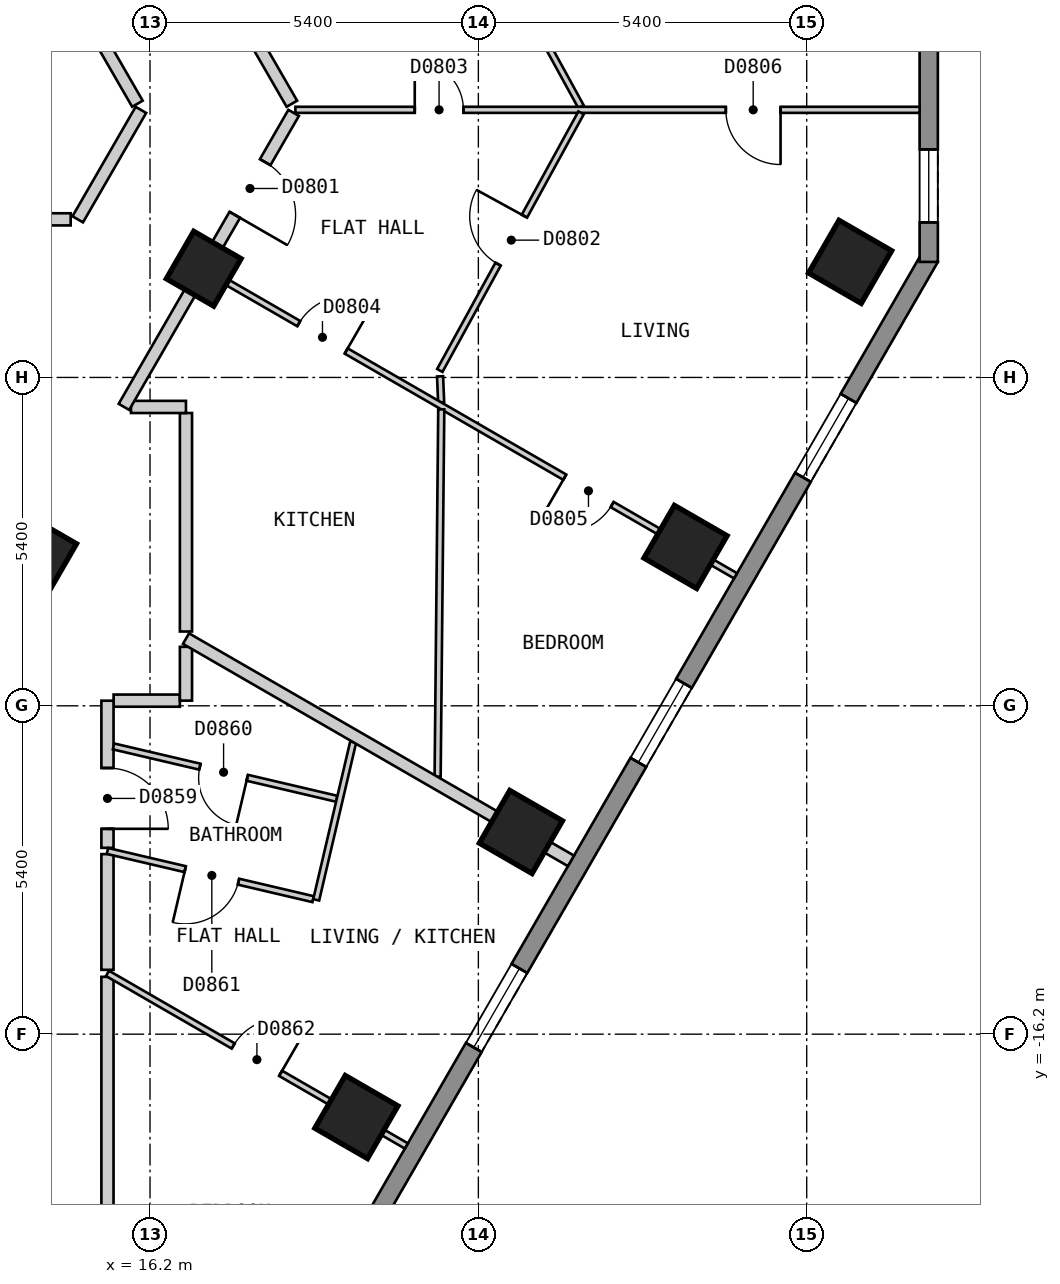
"""IFC4 building model, lengths in metres.
Left out: names, types, materials, properties, quantities, classifications, styles, units other than length and angle.
Written with IfcOpenShell. Run it as: python <this file> out.ifc"""

import sys

from ifc_helpers import new_model, si_unit, direction, frame, frame_2d, origin, origin_2d, place, context, subcontext, project, spatial, polyline, rectangle, outline, extrude, element, fill, save


model = new_model("IFC4")
c1 = context("Model", 3, precision=1e-05, world=origin(), true_north=direction((0.0, 1.0)))
c2 = subcontext(c1, "Body", "Model", "MODEL_VIEW")
j1 = project(units=[si_unit("LENGTHUNIT", "METRE"), si_unit("PLANEANGLEUNIT", "RADIAN")], contexts=[c1])
p1 = place(None, origin())
s1 = spatial("IfcSite", under=j1, at=p1, CompositionType="ELEMENT")
p2 = place(p1, origin())
s2 = spatial("IfcBuilding", under=s1, at=p2, CompositionType="ELEMENT")
p3 = place(p2, frame((0.0, 0.0, 84.0)))
s3 = spatial("IfcBuildingStorey", under=s2, at=p3, CompositionType="ELEMENT", Elevation=84.0)
for number, where, z_axis, x_axis in (
    (1, (19.594, -17.563, 0.0), (0.0, 0.0, 1.0), (0.5, 0.866, 0.0)),
    (2, (22.3, -12.875, 0.0), (0.0, 0.0, 1.0), (0.5, 0.866, 0.0)),
    (3, (25.007, -8.187, 0.0), (0.0, 0.0, 1.0), (0.5, 0.866, 0.0)),
    (4, (27.714, -3.499, 0.0), (0.0, 0.0, 1.0), (0.5, 0.866, 0.0)),
):
    element("IfcColumn", number, at=place(p3, frame(where, z_axis=z_axis, x_axis=x_axis)), inside=s3, PredefinedType="COLUMN", context=c2, shape_type="SweptSolid", body=[
        extrude(rectangle(XDim=1.0, YDim=1.0, at=origin_2d()), origin(), (0.0, 0.0, 1.0), 3.0),
    ])
for number, where, z_axis, x_axis in (
    (5, (14.376, -8.3, 0.0), (0.0, 0.0, 1.0), (0.5, 0.866, 0.0)),
    (6, (17.083, -3.612, 0.0), (0.0, 0.0, 1.0), (0.5, 0.866, 0.0)),
):
    element("IfcColumn", number, at=place(p3, frame(where, z_axis=z_axis, x_axis=x_axis)), inside=s3, PredefinedType="COLUMN", context=c2, shape_type="SweptSolid", body=[
        extrude(rectangle(XDim=0.9, YDim=0.9, at=origin_2d()), origin(), (0.0, 0.0, 1.0), 3.0),
    ])
p4 = place(p3, frame((17.479, -23.425, 0.0), z_axis=(0.0, 0.0, 1.0), x_axis=(0.500035407905, 0.866004960056, 0.0)))
e7 = element("IfcWall", 7, at=p4, inside=s3, PredefinedType="SOLIDWALL", context=c2, shape_type="SweptSolid", body=[
    extrude(outline(polyline([(0.0, -0.15), (23.094, -0.15), (23.014, 0.15), (0.08, 0.15), (0.0, -0.15)])), origin(), (0.0, 0.0, 1.0), 2.7),
])
p5 = place(p4, frame((2.677, 0.0, 0.15)))
e8 = element("IfcOpeningElement", 8, at=p5, cuts=e7, PredefinedType="OPENING", context=c2, shape_type="SweptSolid", body=[
    extrude(rectangle(XDim=1.5, YDim=2.1, at=frame_2d((0.75, 1.05))), frame((0.0, 0.16, 0.0), z_axis=(0.0, -1.0, 0.0), x_axis=(1.0, 0.0, 0.0)), (0.0, 0.0, 1.0), 0.32),
])
p6 = place(p4, frame((8.091, 0.0, 0.15)))
e9 = element("IfcOpeningElement", 9, at=p6, cuts=e7, PredefinedType="OPENING", context=c2, shape_type="SweptSolid", body=[
    extrude(rectangle(XDim=1.5, YDim=2.1, at=frame_2d((0.75, 1.05))), frame((0.0, 0.16, 0.0), z_axis=(0.0, -1.0, 0.0), x_axis=(1.0, 0.0, 0.0)), (0.0, 0.0, 1.0), 0.32),
])
p7 = place(p4, frame((13.504, 0.0, 0.15)))
e10 = element("IfcOpeningElement", 10, at=p7, cuts=e7, PredefinedType="OPENING", context=c2, shape_type="SweptSolid", body=[
    extrude(rectangle(XDim=1.5, YDim=2.1, at=frame_2d((0.75, 1.05))), frame((0.0, 0.16, 0.0), z_axis=(0.0, -1.0, 0.0), x_axis=(1.0, 0.0, 0.0)), (0.0, 0.0, 1.0), 0.32),
])
p8 = place(p4, frame((18.917, 0.0, 0.15)))
e11 = element("IfcOpeningElement", 11, at=p8, cuts=e7, PredefinedType="OPENING", context=c2, shape_type="SweptSolid", body=[
    extrude(rectangle(XDim=1.5, YDim=2.1, at=frame_2d((0.75, 1.05))), frame((0.0, 0.16, 0.0), z_axis=(0.0, -1.0, 0.0), x_axis=(1.0, 0.0, 0.0)), (0.0, 0.0, 1.0), 0.32),
])
p9 = place(p3, frame((29.007, -3.5, 0.0), z_axis=(0.0, 0.0, 1.0), x_axis=(0.0, 1.0, 0.0)))
e12 = element("IfcWall", 12, at=p9, inside=s3, PredefinedType="SOLIDWALL", context=c2, shape_type="SweptSolid", body=[
    extrude(outline(polyline([(0.0, -0.15), (5.0, -0.15), (4.92, 0.15), (0.08, 0.15), (0.0, -0.15)])), origin(), (0.0, 0.0, 1.0), 2.7),
])
p10 = place(p9, frame((0.65, 0.0, 0.15)))
e13 = element("IfcOpeningElement", 13, at=p10, cuts=e12, PredefinedType="OPENING", context=c2, shape_type="SweptSolid", body=[
    extrude(rectangle(XDim=1.2, YDim=2.1, at=frame_2d((0.6, 1.05))), frame((0.0, 0.16, 0.0), z_axis=(0.0, -1.0, 0.0), x_axis=(1.0, 0.0, 0.0)), (0.0, 0.0, 1.0), 0.32),
])
p11 = place(p3, frame((10.913, 7.899, 0.0), z_axis=(0.0, 0.0, 1.0), x_axis=(0.500028940566, -0.866008694296, 0.0)))
e14 = element("IfcWall", 14, at=p11, inside=s3, PredefinedType="PARTITIONING", context=c2, shape_type="SweptSolid", body=[
    extrude(rectangle(XDim=10.159, YDim=0.2, at=frame_2d((5.08, 0.0))), origin(), (0.0, 0.0, 1.0), 2.7),
])
p12 = place(p11, frame((4.63, 0.0, 0.0)))
e15 = element("IfcOpeningElement", 15, at=p12, cuts=e14, PredefinedType="OPENING", context=c2, shape_type="SweptSolid", body=[
    extrude(rectangle(XDim=0.9, YDim=2.1, at=frame_2d((0.45, 1.05))), frame((0.0, 0.11, 0.0), z_axis=(0.0, -1.0, 0.0), x_axis=(1.0, 0.0, 0.0)), (0.0, 0.0, 1.0), 0.22),
])
p13 = place(p3, frame((8.488, 16.5, 0.0), z_axis=(0.0, 0.0, 1.0), x_axis=(0.499986836607, -0.86603300354, 0.0)))
e16 = element("IfcWall", 16, at=p13, inside=s3, PredefinedType="PARTITIONING", context=c2, shape_type="SweptSolid", body=[
    extrude(rectangle(XDim=20.09, YDim=0.2, at=frame_2d((10.045, 0.0))), origin(), (0.0, 0.0, 1.0), 2.7),
])
p14 = place(p13, frame((4.523, 0.0, 0.0)))
e17 = element("IfcOpeningElement", 17, at=p14, cuts=e16, PredefinedType="OPENING", context=c2, shape_type="SweptSolid", body=[
    extrude(rectangle(XDim=1.0, YDim=2.1, at=frame_2d((0.5, 1.05))), frame((0.0, 0.11, 0.0), z_axis=(0.0, -1.0, 0.0), x_axis=(1.0, 0.0, 0.0)), (0.0, 0.0, 1.0), 0.22),
])
p15 = place(p3, frame((15.5, -13.239, 0.0), z_axis=(0.0, 0.0, 1.0), x_axis=(0.0, -1.0, 0.0)))
e18 = element("IfcWall", 18, at=p15, inside=s3, PredefinedType="PARTITIONING", context=c2, shape_type="SweptSolid", body=[
    extrude(rectangle(XDim=1.903, YDim=0.2, at=frame_2d((0.952, 0.0))), origin(), (0.0, 0.0, 1.0), 2.7),
])
p16 = place(p3, frame((16.791, -5.985, 0.0), z_axis=(0.0, 0.0, 1.0), x_axis=(0.0, -1.0, 0.0)))
e19 = element("IfcWall", 19, at=p16, inside=s3, PredefinedType="PARTITIONING", context=c2, shape_type="SweptSolid", body=[
    extrude(rectangle(XDim=3.593, YDim=0.2, at=frame_2d((1.796, 0.0))), origin(), (0.0, 0.0, 1.0), 2.7),
])
p17 = place(p3, frame((15.887, -5.885, 0.0), z_axis=(0.0, 0.0, 1.0), x_axis=(1.0, 0.0, 0.0)))
e20 = element("IfcWall", 20, at=p17, inside=s3, PredefinedType="PARTITIONING", context=c2, shape_type="SweptSolid", body=[
    extrude(rectangle(XDim=0.904, YDim=0.2, at=frame_2d((0.452, 0.0))), origin(), (0.0, 0.0, 1.0), 2.7),
])
p18 = place(p3, frame((15.601, -10.715, 0.0), z_axis=(0.0, 0.0, 1.0), x_axis=(1.0, 0.0, 0.0)))
e21 = element("IfcWall", 21, at=p18, inside=s3, PredefinedType="PARTITIONING", context=c2, shape_type="SweptSolid", body=[
    extrude(rectangle(XDim=1.09, YDim=0.2, at=frame_2d((0.545, 0.0))), origin(), (0.0, 0.0, 1.0), 2.7),
])
p19 = place(p3, frame((6.929, -2.8, 0.0), z_axis=(0.0, 0.0, 1.0), x_axis=(1.0, 0.0, 0.0)))
e22 = element("IfcWall", 22, at=p19, inside=s3, PredefinedType="PARTITIONING", context=c2, shape_type="SweptSolid", body=[
    extrude(rectangle(XDim=7.966, YDim=0.2, at=frame_2d((3.983, 0.0))), origin(), (0.0, 0.0, 1.0), 2.7),
])
p20 = place(p3, frame((15.011, -2.8, 0.0), z_axis=(0.0, 0.0, 1.0), x_axis=(0.499929208183, 0.866066271601, 0.0)))
e23 = element("IfcWall", 23, at=p20, inside=s3, PredefinedType="PARTITIONING", context=c2, shape_type="SweptSolid", body=[
    extrude(rectangle(XDim=2.078, YDim=0.2, at=frame_2d((1.039, 0.0))), origin(), (0.0, 0.0, 1.0), 2.7),
])
p21 = place(p3, frame((15.771, -5.884, 0.0), z_axis=(0.0, 0.0, 1.0), x_axis=(0.499939494019, 0.866060334111, 0.0)))
e24 = element("IfcWall", 24, at=p21, inside=s3, PredefinedType="PARTITIONING", context=c2, shape_type="SweptSolid", body=[
    extrude(rectangle(XDim=5.583, YDim=0.2, at=frame_2d((2.792, 0.0))), origin(), (0.0, 0.0, 1.0), 2.7),
])
p22 = place(p21, frame((3.647, 0.0, 0.0)))
e25 = element("IfcOpeningElement", 25, at=p22, cuts=e24, PredefinedType="OPENING", context=c2, shape_type="SweptSolid", body=[
    extrude(rectangle(XDim=1.0, YDim=2.1, at=frame_2d((0.5, 1.05))), frame((0.0, 0.11, 0.0), z_axis=(0.0, -1.0, 0.0), x_axis=(1.0, 0.0, 0.0)), (0.0, 0.0, 1.0), 0.22),
])
p23 = place(p3, frame((15.5, -21.199, 0.0), z_axis=(0.0, 0.0, 1.0), x_axis=(0.0, 1.0, 0.0)))
e26 = element("IfcWall", 26, at=p23, inside=s3, PredefinedType="PARTITIONING", context=c2, shape_type="SweptSolid", body=[
    extrude(rectangle(XDim=5.942, YDim=0.2, at=frame_2d((2.971, 0.0))), origin(), (0.0, 0.0, 1.0), 2.7),
])
p24 = place(p3, frame((15.5, -13.136, 0.0), z_axis=(0.0, 0.0, 1.0), x_axis=(0.0, 1.0, 0.0)))
e27 = element("IfcWall", 27, at=p24, inside=s3, PredefinedType="PARTITIONING", context=c2, shape_type="SweptSolid", body=[
    extrude(rectangle(XDim=2.42, YDim=0.2, at=frame_2d((1.21, 0.0))), origin(), (0.0, 0.0, 1.0), 2.7),
])
p25 = place(p24, frame((0.313, 0.0, 0.0)))
e28 = element("IfcOpeningElement", 28, at=p25, cuts=e27, PredefinedType="OPENING", context=c2, shape_type="SweptSolid", body=[
    extrude(rectangle(XDim=1.0, YDim=2.1, at=frame_2d((0.5, 1.05))), frame((0.0, 0.11, 0.0), z_axis=(0.0, -1.0, 0.0), x_axis=(1.0, 0.0, 0.0)), (0.0, 0.0, 1.0), 0.22),
])
p26 = place(p3, frame((16.791, -10.715, 0.0), z_axis=(0.0, 0.0, 1.0), x_axis=(0.0, 1.0, 0.0)))
e29 = element("IfcWall", 29, at=p26, inside=s3, PredefinedType="PARTITIONING", context=c2, shape_type="SweptSolid", body=[
    extrude(rectangle(XDim=0.885, YDim=0.2, at=frame_2d((0.442, 0.0))), origin(), (0.0, 0.0, 1.0), 2.7),
])
p27 = place(p3, frame((20.964, 3.287, 0.0), z_axis=(0.0, 0.0, 1.0), x_axis=(0.48115599782, -0.87663499004, 0.0)))
e30 = element("IfcWall", 30, at=p27, inside=s3, PredefinedType="PARTITIONING", context=c2, shape_type="SweptSolid", body=[
    extrude(rectangle(XDim=4.83, YDim=0.1, at=frame_2d((2.415, 0.0))), origin(), (0.0, 0.0, 1.0), 2.7),
])
p28 = place(p3, frame((20.97, -5.382, 0.0), z_axis=(0.0, 0.0, 1.0), x_axis=(0.042272072097, -0.999106136464, 0.0)))
e31 = element("IfcWall", 31, at=p28, inside=s3, PredefinedType="PARTITIONING", context=c2, shape_type="SweptSolid", body=[
    extrude(rectangle(XDim=0.427, YDim=0.1, at=frame_2d((0.214, 0.0))), origin(), (0.0, 0.0, 1.0), 2.7),
])
p29 = place(p3, frame((15.6, -11.468, 0.0), z_axis=(0.0, 0.0, 1.0), x_axis=(0.973574036597, -0.228371616592, 0.0)))
e32 = element("IfcWall", 32, at=p29, inside=s3, PredefinedType="PARTITIONING", context=c2, shape_type="SweptSolid", body=[
    extrude(rectangle(XDim=3.771, YDim=0.1, at=frame_2d((1.885, 0.0))), origin(), (0.0, 0.0, 1.0), 2.7),
])
p30 = place(p29, frame((1.459, 0.0, 0.0)))
e33 = element("IfcOpeningElement", 33, at=p30, cuts=e32, PredefinedType="OPENING", context=c2, shape_type="SweptSolid", body=[
    extrude(rectangle(XDim=0.8, YDim=2.1, at=frame_2d((0.4, 1.05))), frame((0.0, 0.06, 0.0), z_axis=(0.0, -1.0, 0.0), x_axis=(1.0, 0.0, 0.0)), (0.0, 0.0, 1.0), 0.12),
])
p31 = place(p3, frame((15.5, -13.187, 0.0), z_axis=(0.0, 0.0, 1.0), x_axis=(0.973612163993, -0.228209014119, 0.0)))
e34 = element("IfcWall", 34, at=p31, inside=s3, PredefinedType="PARTITIONING", context=c2, shape_type="SweptSolid", body=[
    extrude(rectangle(XDim=3.475, YDim=0.1, at=frame_2d((1.737, 0.0))), origin(), (0.0, 0.0, 1.0), 2.7),
])
p32 = place(p31, frame((1.313, 0.0, 0.0)))
e35 = element("IfcOpeningElement", 35, at=p32, cuts=e34, PredefinedType="OPENING", context=c2, shape_type="SweptSolid", body=[
    extrude(rectangle(XDim=0.9, YDim=2.1, at=frame_2d((0.45, 1.05))), frame((0.0, 0.06, 0.0), z_axis=(0.0, -1.0, 0.0), x_axis=(1.0, 0.0, 0.0)), (0.0, 0.0, 1.0), 0.12),
])
p33 = place(p3, frame((15.5, -15.2, 0.0), z_axis=(0.0, 0.0, 1.0), x_axis=(0.866035181374, -0.499983064336, 0.0)))
e36 = element("IfcWall", 36, at=p33, inside=s3, PredefinedType="PARTITIONING", context=c2, shape_type="SweptSolid", body=[
    extrude(rectangle(XDim=5.677, YDim=0.1, at=frame_2d((2.838, 0.0))), origin(), (0.0, 0.0, 1.0), 2.7),
])
p34 = place(p33, frame((2.388, 0.0, 0.0)))
e37 = element("IfcOpeningElement", 37, at=p34, cuts=e36, PredefinedType="OPENING", context=c2, shape_type="SweptSolid", body=[
    extrude(rectangle(XDim=0.9, YDim=2.1, at=frame_2d((0.45, 1.05))), frame((0.0, 0.06, 0.0), z_axis=(0.0, -1.0, 0.0), x_axis=(1.0, 0.0, 0.0)), (0.0, 0.0, 1.0), 0.12),
])
p35 = place(p3, frame((17.169, -3.662, 0.0), z_axis=(0.0, 0.0, 1.0), x_axis=(0.866047370643, -0.499961950354, 0.0)))
e38 = element("IfcWall", 38, at=p35, inside=s3, PredefinedType="PARTITIONING", context=c2, shape_type="SweptSolid", body=[
    extrude(rectangle(XDim=10.001, YDim=0.1, at=frame_2d((5.0, 0.0))), origin(), (0.0, 0.0, 1.0), 2.7),
])
p36 = place(p35, frame((1.706, 0.0, 0.0)))
e39 = element("IfcOpeningElement", 39, at=p36, cuts=e38, PredefinedType="OPENING", context=c2, shape_type="SweptSolid", body=[
    extrude(rectangle(XDim=0.9, YDim=2.1, at=frame_2d((0.45, 1.05))), frame((0.0, 0.06, 0.0), z_axis=(0.0, -1.0, 0.0), x_axis=(1.0, 0.0, 0.0)), (0.0, 0.0, 1.0), 0.12),
])
p37 = place(p35, frame((6.757, 0.0, 0.0)))
e40 = element("IfcOpeningElement", 40, at=p37, cuts=e38, PredefinedType="OPENING", context=c2, shape_type="SweptSolid", body=[
    extrude(rectangle(XDim=0.9, YDim=2.1, at=frame_2d((0.45, 1.05))), frame((0.0, 0.06, 0.0), z_axis=(0.0, -1.0, 0.0), x_axis=(1.0, 0.0, 0.0)), (0.0, 0.0, 1.0), 0.12),
])
p38 = place(p3, frame((18.591, -0.999, 0.0), z_axis=(0.0, 0.0, 1.0), x_axis=(1.0, 0.0, 0.0)))
e41 = element("IfcWall", 41, at=p38, inside=s3, PredefinedType="PARTITIONING", context=c2, shape_type="SweptSolid", body=[
    extrude(rectangle(XDim=10.266, YDim=0.1, at=frame_2d((5.133, 0.0))), origin(), (0.0, 0.0, 1.0), 2.7),
])
p39 = place(p38, frame((1.963, 0.0, 0.0)))
e42 = element("IfcOpeningElement", 42, at=p39, cuts=e41, PredefinedType="OPENING", context=c2, shape_type="SweptSolid", body=[
    extrude(rectangle(XDim=0.8, YDim=2.1, at=frame_2d((0.4, 1.05))), frame((0.0, 0.06, 0.0), z_axis=(0.0, -1.0, 0.0), x_axis=(1.0, 0.0, 0.0)), (0.0, 0.0, 1.0), 0.12),
])
p40 = place(p38, frame((7.079, 0.0, 0.0)))
e43 = element("IfcOpeningElement", 43, at=p40, cuts=e41, PredefinedType="OPENING", context=c2, shape_type="SweptSolid", body=[
    extrude(rectangle(XDim=0.9, YDim=2.1, at=frame_2d((0.45, 1.05))), frame((0.0, 0.06, 0.0), z_axis=(0.0, -1.0, 0.0), x_axis=(1.0, 0.0, 0.0)), (0.0, 0.0, 1.0), 0.12),
])
p41 = place(p3, frame((20.966, -5.285, 0.0), z_axis=(0.0, 0.0, 1.0), x_axis=(0.480851410542, 0.876802099096, 0.0)))
e44 = element("IfcWall", 44, at=p41, inside=s3, PredefinedType="PARTITIONING", context=c2, shape_type="SweptSolid", body=[
    extrude(rectangle(XDim=4.831, YDim=0.1, at=frame_2d((2.416, 0.0))), origin(), (0.0, 0.0, 1.0), 2.7),
])
p42 = place(p41, frame((1.994, 0.0, 0.0)))
e45 = element("IfcOpeningElement", 45, at=p42, cuts=e44, PredefinedType="OPENING", context=c2, shape_type="SweptSolid", body=[
    extrude(rectangle(XDim=0.9, YDim=2.1, at=frame_2d((0.45, 1.05))), frame((0.0, 0.06, 0.0), z_axis=(0.0, -1.0, 0.0), x_axis=(1.0, 0.0, 0.0)), (0.0, 0.0, 1.0), 0.12),
])
p43 = place(p3, frame((18.933, -13.991, 0.0), z_axis=(0.0, 0.0, 1.0), x_axis=(0.228170964135, 0.973621081903, 0.0)))
e46 = element("IfcWall", 46, at=p43, inside=s3, PredefinedType="PARTITIONING", context=c2, shape_type="SweptSolid", body=[
    extrude(rectangle(XDim=2.664, YDim=0.1, at=frame_2d((1.332, 0.0))), origin(), (0.0, 0.0, 1.0), 2.7),
])
p44 = place(p3, frame((20.93, -11.968, 0.0), z_axis=(0.0, 0.0, 1.0), x_axis=(0.009938100012, 0.999950615865, 0.0)))
e47 = element("IfcWall", 47, at=p44, inside=s3, PredefinedType="PARTITIONING", context=c2, shape_type="SweptSolid", body=[
    extrude(rectangle(XDim=6.043, YDim=0.1, at=frame_2d((3.021, 0.0))), origin(), (0.0, 0.0, 1.0), 2.7),
])
p45 = place(p3, frame((16.792, -9.695, 0.0), z_axis=(0.0, 0.0, 1.0), x_axis=(0.86603765469, -0.499978780208, 0.0)))
e48 = element("IfcWall", 48, at=p45, inside=s3, PredefinedType="PARTITIONING", context=c2, shape_type="SweptSolid", body=[
    extrude(rectangle(XDim=7.31, YDim=0.2, at=frame_2d((3.655, 0.0))), origin(), (0.0, 0.0, 1.0), 2.7),
])
p46 = place(p6, origin())
e49 = element("IfcWindow", 49, at=p46, inside=s3, PartitioningType="SINGLE_PANEL", PredefinedType="WINDOW", context=c2, shape_type="SweptSolid", body=[
    extrude(rectangle(XDim=1.5, YDim=2.1, at=frame_2d((0.75, 1.05))), frame((0.0, 0.03, 0.0), z_axis=(0.0, -1.0, 0.0), x_axis=(1.0, 0.0, 0.0)), (0.0, 0.0, 1.0), 0.06),
])
fill(e9, e49)
p47 = place(p7, origin())
e50 = element("IfcWindow", 50, at=p47, inside=s3, PartitioningType="SINGLE_PANEL", PredefinedType="WINDOW", context=c2, shape_type="SweptSolid", body=[
    extrude(rectangle(XDim=1.5, YDim=2.1, at=frame_2d((0.75, 1.05))), frame((0.0, 0.03, 0.0), z_axis=(0.0, -1.0, 0.0), x_axis=(1.0, 0.0, 0.0)), (0.0, 0.0, 1.0), 0.06),
])
fill(e10, e50)
p48 = place(p8, origin())
e51 = element("IfcWindow", 51, at=p48, inside=s3, PartitioningType="SINGLE_PANEL", PredefinedType="WINDOW", context=c2, shape_type="SweptSolid", body=[
    extrude(rectangle(XDim=1.5, YDim=2.1, at=frame_2d((0.75, 1.05))), frame((0.0, 0.03, 0.0), z_axis=(0.0, -1.0, 0.0), x_axis=(1.0, 0.0, 0.0)), (0.0, 0.0, 1.0), 0.06),
])
fill(e11, e51)
p49 = place(p10, origin())
e52 = element("IfcWindow", 52, at=p49, inside=s3, PartitioningType="SINGLE_PANEL", PredefinedType="WINDOW", context=c2, shape_type="SweptSolid", body=[
    extrude(rectangle(XDim=1.2, YDim=2.1, at=frame_2d((0.6, 1.05))), frame((0.0, 0.03, 0.0), z_axis=(0.0, -1.0, 0.0), x_axis=(1.0, 0.0, 0.0)), (0.0, 0.0, 1.0), 0.06),
])
fill(e13, e52)
p50 = place(p22, origin())
e53 = element("IfcDoor", 53, at=p50, inside=s3, OperationType="SINGLE_SWING_LEFT", PredefinedType="DOOR", context=c2, shape_type="SweptSolid", body=[
    extrude(rectangle(XDim=1.0, YDim=2.1, at=frame_2d((0.5, 1.05))), frame((0.0, 0.025, 0.0), z_axis=(0.0, -1.0, 0.0), x_axis=(1.0, 0.0, 0.0)), (0.0, 0.0, 1.0), 0.05),
])
fill(e25, e53)
p51 = place(p42, origin())
e54 = element("IfcDoor", 54, at=p51, inside=s3, OperationType="SINGLE_SWING_RIGHT", PredefinedType="DOOR", context=c2, shape_type="SweptSolid", body=[
    extrude(rectangle(XDim=0.9, YDim=2.1, at=frame_2d((0.45, 1.05))), frame((0.0, 0.025, 0.0), z_axis=(0.0, -1.0, 0.0), x_axis=(1.0, 0.0, 0.0)), (0.0, 0.0, 1.0), 0.05),
])
fill(e45, e54)
p52 = place(p39, origin())
e55 = element("IfcDoor", 55, at=p52, inside=s3, OperationType="SINGLE_SWING_LEFT", PredefinedType="DOOR", context=c2, shape_type="SweptSolid", body=[
    extrude(rectangle(XDim=0.8, YDim=2.1, at=frame_2d((0.4, 1.05))), frame((0.0, 0.025, 0.0), z_axis=(0.0, -1.0, 0.0), x_axis=(1.0, 0.0, 0.0)), (0.0, 0.0, 1.0), 0.05),
])
fill(e42, e55)
p53 = place(p36, origin())
e56 = element("IfcDoor", 56, at=p53, inside=s3, OperationType="SINGLE_SWING_RIGHT", PredefinedType="DOOR", context=c2, shape_type="SweptSolid", body=[
    extrude(rectangle(XDim=0.9, YDim=2.1, at=frame_2d((0.45, 1.05))), frame((0.0, 0.025, 0.0), z_axis=(0.0, -1.0, 0.0), x_axis=(1.0, 0.0, 0.0)), (0.0, 0.0, 1.0), 0.05),
])
fill(e39, e56)
p54 = place(p37, origin())
e57 = element("IfcDoor", 57, at=p54, inside=s3, OperationType="SINGLE_SWING_LEFT", PredefinedType="DOOR", context=c2, shape_type="SweptSolid", body=[
    extrude(rectangle(XDim=0.9, YDim=2.1, at=frame_2d((0.45, 1.05))), frame((0.0, 0.025, 0.0), z_axis=(0.0, -1.0, 0.0), x_axis=(1.0, 0.0, 0.0)), (0.0, 0.0, 1.0), 0.05),
])
fill(e40, e57)
p55 = place(p40, origin())
e58 = element("IfcDoor", 58, at=p55, inside=s3, OperationType="SINGLE_SWING_RIGHT", PredefinedType="DOOR", context=c2, shape_type="SweptSolid", body=[
    extrude(rectangle(XDim=0.9, YDim=2.1, at=frame_2d((0.45, 1.05))), frame((0.0, 0.025, 0.0), z_axis=(0.0, -1.0, 0.0), x_axis=(1.0, 0.0, 0.0)), (0.0, 0.0, 1.0), 0.05),
])
fill(e43, e58)
p56 = place(p25, origin())
e59 = element("IfcDoor", 59, at=p56, inside=s3, OperationType="SINGLE_SWING_LEFT", PredefinedType="DOOR", context=c2, shape_type="SweptSolid", body=[
    extrude(rectangle(XDim=1.0, YDim=2.1, at=frame_2d((0.5, 1.05))), frame((0.0, 0.025, 0.0), z_axis=(0.0, -1.0, 0.0), x_axis=(1.0, 0.0, 0.0)), (0.0, 0.0, 1.0), 0.05),
])
fill(e28, e59)
p57 = place(p30, origin())
e60 = element("IfcDoor", 60, at=p57, inside=s3, OperationType="SINGLE_SWING_RIGHT", PredefinedType="DOOR", context=c2, shape_type="SweptSolid", body=[
    extrude(rectangle(XDim=0.8, YDim=2.1, at=frame_2d((0.4, 1.05))), frame((0.0, 0.025, 0.0), z_axis=(0.0, -1.0, 0.0), x_axis=(1.0, 0.0, 0.0)), (0.0, 0.0, 1.0), 0.05),
])
fill(e33, e60)
p58 = place(p32, origin())
e61 = element("IfcDoor", 61, at=p58, inside=s3, OperationType="SINGLE_SWING_LEFT", PredefinedType="DOOR", context=c2, shape_type="SweptSolid", body=[
    extrude(rectangle(XDim=0.9, YDim=2.1, at=frame_2d((0.45, 1.05))), frame((0.0, 0.025, 0.0), z_axis=(0.0, -1.0, 0.0), x_axis=(1.0, 0.0, 0.0)), (0.0, 0.0, 1.0), 0.05),
])
fill(e35, e61)
p59 = place(p34, origin())
e62 = element("IfcDoor", 62, at=p59, inside=s3, OperationType="SINGLE_SWING_RIGHT", PredefinedType="DOOR", context=c2, shape_type="SweptSolid", body=[
    extrude(rectangle(XDim=0.9, YDim=2.1, at=frame_2d((0.45, 1.05))), frame((0.0, 0.025, 0.0), z_axis=(0.0, -1.0, 0.0), x_axis=(1.0, 0.0, 0.0)), (0.0, 0.0, 1.0), 0.05),
])
fill(e37, e62)
save(model, sys.argv[1])
